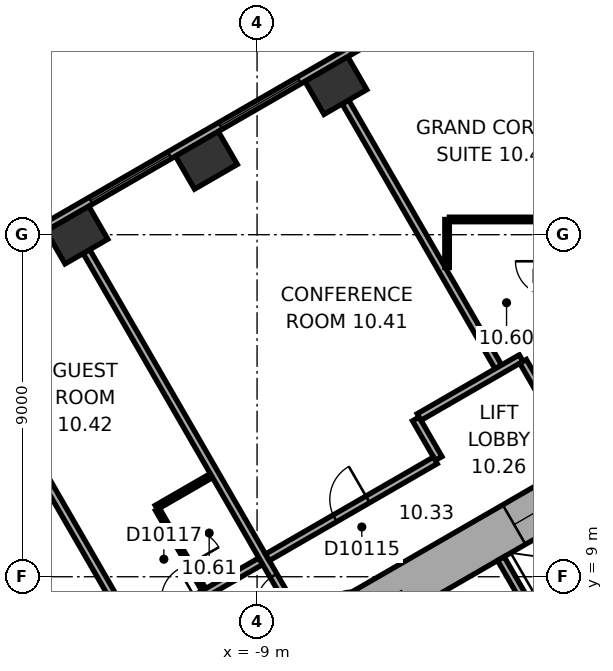
"""IFC4 building model, lengths in metres.
Left out: names, types, materials, properties, quantities, classifications, styles, units other than length and angle.
Written with IfcOpenShell. Run it as: python <this file> out.ifc"""

import sys

from ifc_helpers import new_model, si_unit, direction, frame, frame_2d, origin, origin_2d, place, context, subcontext, project, spatial, rectangle, extrude, element, fill, save


model = new_model("IFC4")
c1 = context("Model", 3, precision=1e-05, world=origin(), true_north=direction((0.0, 1.0)))
c2 = subcontext(c1, "Body", "Model", "MODEL_VIEW")
j1 = project(units=[si_unit("LENGTHUNIT", "METRE"), si_unit("PLANEANGLEUNIT", "RADIAN")], contexts=[c1])
p1 = place(None, origin())
s1 = spatial("IfcSite", under=j1, at=p1, CompositionType="ELEMENT")
p2 = place(p1, origin())
s2 = spatial("IfcBuilding", under=s1, at=p2, CompositionType="ELEMENT")
p3 = place(p2, frame((0.0, 0.0, 53.9)))
s3 = spatial("IfcBuildingStorey", under=s2, at=p3, CompositionType="ELEMENT", Elevation=53.9)
for number, where, z_axis, x_axis in (
    (1, (-6.926, 21.925, 0.0), (0.0, 0.0, 1.0), (-0.866, -0.5, 0.0)),
    (2, (-10.333, 19.957, 0.0), (0.0, 0.0, 1.0), (-0.866, -0.5, 0.0)),
    (3, (-13.74, 17.99, 0.0), (0.0, 0.0, 1.0), (-0.866, -0.5, 0.0)),
):
    element("IfcColumn", number, at=place(p3, frame(where, z_axis=z_axis, x_axis=x_axis)), inside=s3, PredefinedType="COLUMN", context=c2, shape_type="SweptSolid", body=[
        extrude(rectangle(XDim=1.3, YDim=1.0, at=origin_2d()), origin(), (0.0, 0.0, 1.0), 3.3),
    ])
p4 = place(p3, frame((0.3, 11.836, 0.0), z_axis=(0.0, 0.0, 1.0), x_axis=(-0.866021384402, -0.500006961711, 0.0)))
e4 = element("IfcWall", 4, at=p4, inside=s3, PredefinedType="SHEAR", context=c2, shape_type="SweptSolid", body=[
    extrude(rectangle(XDim=12.355, YDim=1.2, at=frame_2d((6.178, 0.0))), origin(), (0.0, 0.0, 1.0), 3.3),
])
p5 = place(p4, frame((6.378, 0.0, 0.0)))
e5 = element("IfcOpeningElement", 5, at=p5, cuts=e4, PredefinedType="OPENING", context=c2, shape_type="SweptSolid", body=[
    extrude(rectangle(XDim=1.5, YDim=2.1, at=frame_2d((0.75, 1.05))), frame((0.0, 0.61, 0.0), z_axis=(0.0, -1.0, 0.0), x_axis=(1.0, 0.0, 0.0)), (0.0, 0.0, 1.0), 1.22),
])
p6 = place(p4, frame((1.828, 0.0, 0.0)))
e6 = element("IfcOpeningElement", 6, at=p6, cuts=e4, PredefinedType="OPENING", context=c2, shape_type="SweptSolid", body=[
    extrude(rectangle(XDim=1.1, YDim=2.1, at=frame_2d((0.55, 1.05))), frame((0.0, 0.61, 0.0), z_axis=(0.0, -1.0, 0.0), x_axis=(1.0, 0.0, 0.0)), (0.0, 0.0, 1.0), 1.22),
])
p7 = place(p3, frame((-3.136, 24.805, 0.0), z_axis=(0.0, 0.0, 1.0), x_axis=(-0.866028291626, -0.499994998079, 0.0)))
e7 = element("IfcWall", 7, at=p7, inside=s3, PredefinedType="STANDARD", context=c2, shape_type="SweptSolid", body=[
    extrude(rectangle(XDim=21.246, YDim=0.2, at=frame_2d((10.623, 0.0))), origin(), (0.0, 0.0, 1.0), 3.3),
])
p8 = place(p7, frame((1.555, 0.0, 0.8)))
e8 = element("IfcOpeningElement", 8, at=p8, cuts=e7, PredefinedType="OPENING", context=c2, shape_type="SweptSolid", body=[
    extrude(rectangle(XDim=2.4, YDim=1.7, at=frame_2d((1.2, 0.85))), frame((0.0, 0.11, 0.0), z_axis=(0.0, -1.0, 0.0), x_axis=(1.0, 0.0, 0.0)), (0.0, 0.0, 1.0), 0.22),
])
p9 = place(p7, frame((5.489, 0.0, 0.8)))
e9 = element("IfcOpeningElement", 9, at=p9, cuts=e7, PredefinedType="OPENING", context=c2, shape_type="SweptSolid", body=[
    extrude(rectangle(XDim=2.4, YDim=1.7, at=frame_2d((1.2, 0.85))), frame((0.0, 0.11, 0.0), z_axis=(0.0, -1.0, 0.0), x_axis=(1.0, 0.0, 0.0)), (0.0, 0.0, 1.0), 0.22),
])
p10 = place(p7, frame((9.424, 0.0, 0.8)))
e10 = element("IfcOpeningElement", 10, at=p10, cuts=e7, PredefinedType="OPENING", context=c2, shape_type="SweptSolid", body=[
    extrude(rectangle(XDim=2.4, YDim=1.7, at=frame_2d((1.2, 0.85))), frame((0.0, 0.11, 0.0), z_axis=(0.0, -1.0, 0.0), x_axis=(1.0, 0.0, 0.0)), (0.0, 0.0, 1.0), 0.22),
])
p11 = place(p7, frame((13.358, 0.0, 0.8)))
e11 = element("IfcOpeningElement", 11, at=p11, cuts=e7, PredefinedType="OPENING", context=c2, shape_type="SweptSolid", body=[
    extrude(rectangle(XDim=2.4, YDim=1.7, at=frame_2d((1.2, 0.85))), frame((0.0, 0.11, 0.0), z_axis=(0.0, -1.0, 0.0), x_axis=(1.0, 0.0, 0.0)), (0.0, 0.0, 1.0), 0.22),
])
p12 = place(p7, frame((17.293, 0.0, 0.8)))
e12 = element("IfcOpeningElement", 12, at=p12, cuts=e7, PredefinedType="OPENING", context=c2, shape_type="SweptSolid", body=[
    extrude(rectangle(XDim=2.4, YDim=1.7, at=frame_2d((1.2, 0.85))), frame((0.0, 0.11, 0.0), z_axis=(0.0, -1.0, 0.0), x_axis=(1.0, 0.0, 0.0)), (0.0, 0.0, 1.0), 0.22),
])
p13 = place(p3, frame((0.803, 9.009, 0.0), z_axis=(0.0, 0.0, 1.0), x_axis=(-0.866028230842, -0.499995103361, 0.0)))
e13 = element("IfcWall", 13, at=p13, inside=s3, PredefinedType="PARTITIONING", context=c2, shape_type="SweptSolid", body=[
    extrude(rectangle(XDim=5.4, YDim=0.2, at=frame_2d((2.7, 0.0))), origin(), (0.0, 0.0, 1.0), 3.05),
])
p14 = place(p3, frame((-1.485, 7.572, 0.0), z_axis=(0.0, 0.0, 1.0), x_axis=(-0.50002983664, 0.866008176907, 0.0)))
e14 = element("IfcWall", 14, at=p14, inside=s3, PredefinedType="PARTITIONING", context=c2, shape_type="SweptSolid", body=[
    extrude(rectangle(XDim=2.2, YDim=0.2, at=frame_2d((1.1, 0.0))), origin(), (0.0, 0.0, 1.0), 3.05),
])
p15 = place(p3, frame((-16.898, 15.59, 0.0), z_axis=(0.0, 0.0, 1.0), x_axis=(0.500023458698, -0.866011859475, 0.0)))
e15 = element("IfcWall", 15, at=p15, inside=s3, PredefinedType="PARTITIONING", context=c2, shape_type="SweptSolid", body=[
    extrude(rectangle(XDim=9.572, YDim=0.2, at=frame_2d((4.786, 0.0))), origin(), (0.0, 0.0, 1.0), 3.05),
])
p16 = place(p3, frame((-11.651, 10.825, 0.0), z_axis=(0.0, 0.0, 1.0), x_axis=(0.865998477143, 0.500046635412, 0.0)))
e16 = element("IfcWall", 16, at=p16, inside=s3, PredefinedType="PARTITIONING", context=c2, shape_type="SweptSolid", body=[
    extrude(rectangle(XDim=1.673, YDim=0.12, at=frame_2d((0.836, 0.0))), origin(), (0.0, 0.0, 1.0), 3.05),
])
p17 = place(p3, frame((-10.401, 8.66, 0.0), z_axis=(0.0, 0.0, 1.0), x_axis=(-0.500077547548, 0.865980627057, 0.0)))
e17 = element("IfcWall", 17, at=p17, inside=s3, PredefinedType="PARTITIONING", context=c2, shape_type="SweptSolid", body=[
    extrude(rectangle(XDim=2.44, YDim=0.12, at=frame_2d((1.22, 0.0))), origin(), (0.0, 0.0, 1.0), 3.05),
])
p18 = place(p17, frame((0.77, 0.0, 0.0)))
e18 = element("IfcOpeningElement", 18, at=p18, cuts=e17, PredefinedType="OPENING", context=c2, shape_type="SweptSolid", body=[
    extrude(rectangle(XDim=0.9, YDim=2.1, at=frame_2d((0.45, 1.05))), frame((0.0, 0.07, 0.0), z_axis=(0.0, -1.0, 0.0), x_axis=(1.0, 0.0, 0.0)), (0.0, 0.0, 1.0), 0.14),
])
p19 = place(p3, frame((-8.902, 9.41, 0.0), z_axis=(0.0, 0.0, 1.0), x_axis=(-0.866014299198, -0.500019233215, 0.0)))
e19 = element("IfcWall", 19, at=p19, inside=s3, PredefinedType="PARTITIONING", context=c2, shape_type="SweptSolid", body=[
    extrude(rectangle(XDim=3.133, YDim=0.2, at=frame_2d((1.567, 0.0))), origin(), (0.0, 0.0, 1.0), 3.05),
])
p20 = place(p19, frame((1.978, 0.0, 0.0)))
e20 = element("IfcOpeningElement", 20, at=p20, cuts=e19, PredefinedType="OPENING", context=c2, shape_type="SweptSolid", body=[
    extrude(rectangle(XDim=0.9, YDim=2.1, at=frame_2d((0.45, 1.05))), frame((0.0, 0.11, 0.0), z_axis=(0.0, -1.0, 0.0), x_axis=(1.0, 0.0, 0.0)), (0.0, 0.0, 1.0), 0.22),
])
p21 = place(p3, frame((-7.865, 7.814, 0.0), z_axis=(0.0, 0.0, 1.0), x_axis=(-0.500004234368, 0.866022959057, 0.0)))
e21 = element("IfcWall", 21, at=p21, inside=s3, PredefinedType="PARTITIONING", context=c2, shape_type="SweptSolid", body=[
    extrude(rectangle(XDim=11.25, YDim=0.2, at=frame_2d((5.625, 0.0))), origin(), (0.0, 0.0, 1.0), 3.05),
])
p22 = place(p21, frame((0.5, 0.0, 0.0)))
e22 = element("IfcOpeningElement", 22, at=p22, cuts=e21, PredefinedType="OPENING", context=c2, shape_type="SweptSolid", body=[
    extrude(rectangle(XDim=0.9, YDim=2.1, at=frame_2d((0.45, 1.05))), frame((0.0, 0.11, 0.0), z_axis=(0.0, -1.0, 0.0), x_axis=(1.0, 0.0, 0.0)), (0.0, 0.0, 1.0), 0.22),
])
p23 = place(p3, frame((-6.676, 21.492, 0.0), z_axis=(0.0, 0.0, 1.0), x_axis=(0.500011263043, -0.866018900966, 0.0)))
e23 = element("IfcWall", 23, at=p23, inside=s3, PredefinedType="PARTITIONING", context=c2, shape_type="SweptSolid", body=[
    extrude(rectangle(XDim=8.049, YDim=0.2, at=frame_2d((4.024, 0.0))), origin(), (0.0, 0.0, 1.0), 3.05),
])
p24 = place(p3, frame((-4.823, 13.152, 0.0), z_axis=(0.0, 0.0, 1.0), x_axis=(0.499986357472, -0.866033280158, 0.0)))
e24 = element("IfcWall", 24, at=p24, inside=s3, PredefinedType="PARTITIONING", context=c2, shape_type="SweptSolid", body=[
    extrude(rectangle(XDim=1.201, YDim=0.2, at=frame_2d((0.601, 0.0))), origin(), (0.0, 0.0, 1.0), 3.05),
])
p25 = place(p3, frame((-4.309, 12.061, 0.0), z_axis=(0.0, 0.0, 1.0), x_axis=(-0.866020679205, -0.500008183122, 0.0)))
e25 = element("IfcWall", 25, at=p25, inside=s3, PredefinedType="PARTITIONING", context=c2, shape_type="SweptSolid", body=[
    extrude(rectangle(XDim=5.104, YDim=0.2, at=frame_2d((2.552, 0.0))), origin(), (0.0, 0.0, 1.0), 3.05),
])
p26 = place(p25, frame((2.052, 0.0, 0.0)))
e26 = element("IfcOpeningElement", 26, at=p26, cuts=e25, PredefinedType="OPENING", context=c2, shape_type="SweptSolid", body=[
    extrude(rectangle(XDim=1.0, YDim=2.1, at=frame_2d((0.5, 1.05))), frame((0.0, 0.11, 0.0), z_axis=(0.0, -1.0, 0.0), x_axis=(1.0, 0.0, 0.0)), (0.0, 0.0, 1.0), 0.22),
])
p27 = place(p3, frame((-4.0, 17.137, 0.0), z_axis=(0.0, 0.0, 1.0), x_axis=(0.0, 1.0, 0.0)))
e27 = element("IfcWall", 27, at=p27, inside=s3, PredefinedType="PARTITIONING", context=c2, shape_type="SweptSolid", body=[
    extrude(rectangle(XDim=1.263, YDim=0.12, at=frame_2d((0.632, 0.0))), origin(), (0.0, 0.0, 1.0), 3.05),
])
p28 = place(p3, frame((-3.94, 18.401, 0.0), z_axis=(0.0, 0.0, 1.0), x_axis=(1.0, 0.0, 0.0)))
e28 = element("IfcWall", 28, at=p28, inside=s3, PredefinedType="PARTITIONING", context=c2, shape_type="SweptSolid", body=[
    extrude(rectangle(XDim=2.64, YDim=0.12, at=frame_2d((1.32, 0.0))), origin(), (0.0, 0.0, 1.0), 3.05),
])
p29 = place(p3, frame((-2.05, 14.752, 0.0), z_axis=(0.0, 0.0, 1.0), x_axis=(-0.866030936828, -0.499990416364, 0.0)))
e29 = element("IfcWall", 29, at=p29, inside=s3, PredefinedType="PARTITIONING", context=c2, shape_type="SweptSolid", body=[
    extrude(rectangle(XDim=3.102, YDim=0.2, at=frame_2d((1.551, 0.0))), origin(), (0.0, 0.0, 1.0), 3.05),
])
p30 = place(p3, frame((-1.449, 13.712, 0.0), z_axis=(0.0, 0.0, 1.0), x_axis=(-0.499978356969, 0.866037899034, 0.0)))
e30 = element("IfcWall", 30, at=p30, inside=s3, PredefinedType="PARTITIONING", context=c2, shape_type="SweptSolid", body=[
    extrude(rectangle(XDim=1.101, YDim=0.2, at=frame_2d((0.551, 0.0))), origin(), (0.0, 0.0, 1.0), 3.05),
])
p31 = place(p3, frame((-1.3, 15.301, 0.0), z_axis=(0.0, 0.0, 1.0), x_axis=(-1.0, 0.0, 0.0)))
e31 = element("IfcWall", 31, at=p31, inside=s3, PredefinedType="PARTITIONING", context=c2, shape_type="SweptSolid", body=[
    extrude(rectangle(XDim=1.661, YDim=0.12, at=frame_2d((0.831, 0.0))), origin(), (0.0, 0.0, 1.0), 3.05),
])
p32 = place(p9, origin())
e32 = element("IfcWindow", 32, at=p32, inside=s3, PartitioningType="SINGLE_PANEL", PredefinedType="WINDOW", context=c2, shape_type="SweptSolid", body=[
    extrude(rectangle(XDim=2.4, YDim=1.7, at=frame_2d((1.2, 0.85))), frame((0.0, 0.03, 0.0), z_axis=(0.0, -1.0, 0.0), x_axis=(1.0, 0.0, 0.0)), (0.0, 0.0, 1.0), 0.06),
])
fill(e9, e32)
p33 = place(p10, origin())
e33 = element("IfcWindow", 33, at=p33, inside=s3, PartitioningType="SINGLE_PANEL", PredefinedType="WINDOW", context=c2, shape_type="SweptSolid", body=[
    extrude(rectangle(XDim=2.4, YDim=1.7, at=frame_2d((1.2, 0.85))), frame((0.0, 0.03, 0.0), z_axis=(0.0, -1.0, 0.0), x_axis=(1.0, 0.0, 0.0)), (0.0, 0.0, 1.0), 0.06),
])
fill(e10, e33)
p34 = place(p5, origin())
e34 = element("IfcDoor", 34, at=p34, inside=s3, OperationType="DOUBLE_DOOR_SINGLE_SWING", PredefinedType="DOOR", context=c2, shape_type="SweptSolid", body=[
    extrude(rectangle(XDim=1.5, YDim=2.1, at=frame_2d((0.75, 1.05))), frame((0.0, 0.025, 0.0), z_axis=(0.0, -1.0, 0.0), x_axis=(1.0, 0.0, 0.0)), (0.0, 0.0, 1.0), 0.05),
])
fill(e5, e34)
p35 = place(p6, origin())
e35 = element("IfcDoor", 35, at=p35, inside=s3, OperationType="DOUBLE_DOOR_SLIDING", PredefinedType="DOOR", context=c2, shape_type="SweptSolid", body=[
    extrude(rectangle(XDim=1.1, YDim=2.1, at=frame_2d((0.55, 1.05))), frame((0.0, 0.025, 0.0), z_axis=(0.0, -1.0, 0.0), x_axis=(1.0, 0.0, 0.0)), (0.0, 0.0, 1.0), 0.05),
])
fill(e6, e35)
p36 = place(p26, origin())
e36 = element("IfcDoor", 36, at=p36, inside=s3, OperationType="SINGLE_SWING_LEFT", PredefinedType="DOOR", context=c2, shape_type="SweptSolid", body=[
    extrude(rectangle(XDim=1.0, YDim=2.1, at=frame_2d((0.5, 1.05))), frame((0.0, 0.025, 0.0), z_axis=(0.0, -1.0, 0.0), x_axis=(1.0, 0.0, 0.0)), (0.0, 0.0, 1.0), 0.05),
])
fill(e26, e36)
p37 = place(p18, origin())
e37 = element("IfcDoor", 37, at=p37, inside=s3, OperationType="SINGLE_SWING_LEFT", PredefinedType="DOOR", context=c2, shape_type="SweptSolid", body=[
    extrude(rectangle(XDim=0.9, YDim=2.1, at=frame_2d((0.45, 1.05))), frame((0.0, 0.025, 0.0), z_axis=(0.0, -1.0, 0.0), x_axis=(1.0, 0.0, 0.0)), (0.0, 0.0, 1.0), 0.05),
])
fill(e18, e37)
p38 = place(p22, origin())
e38 = element("IfcDoor", 38, at=p38, inside=s3, OperationType="SINGLE_SWING_LEFT", PredefinedType="DOOR", context=c2, shape_type="SweptSolid", body=[
    extrude(rectangle(XDim=0.9, YDim=2.1, at=frame_2d((0.45, 1.05))), frame((0.0, 0.025, 0.0), z_axis=(0.0, -1.0, 0.0), x_axis=(1.0, 0.0, 0.0)), (0.0, 0.0, 1.0), 0.05),
])
fill(e22, e38)
save(model, sys.argv[1])
